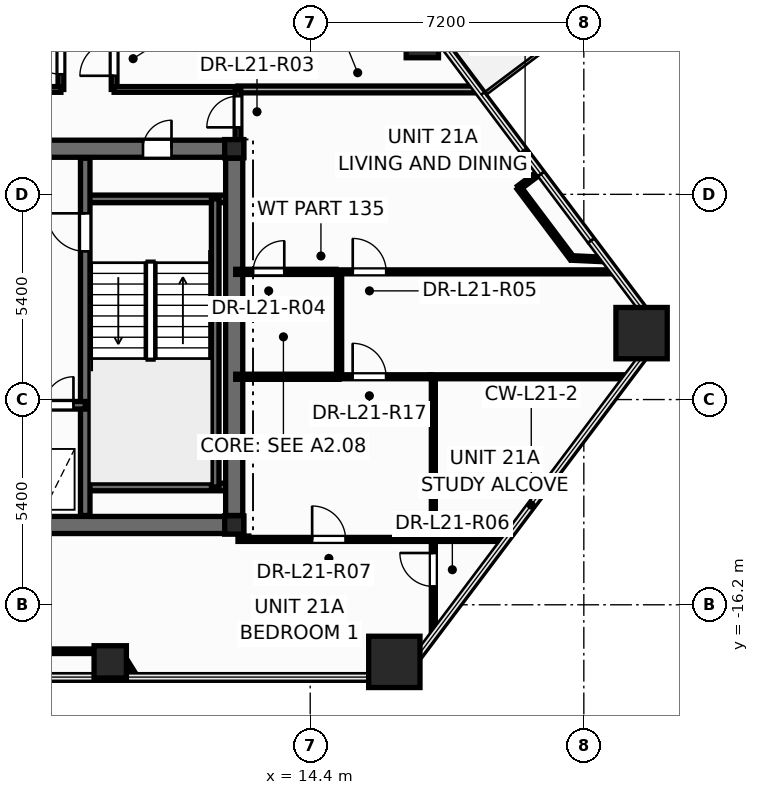
"""IFC4 building model, lengths in metres.
Left out: names, types, materials, properties, quantities, classifications, styles, units other than length and angle.
Written with IfcOpenShell. Run it as: python <this file> out.ifc"""

import sys

from ifc_helpers import new_model, si_unit, direction, frame, frame_2d, origin, origin_2d, place, context, subcontext, project, spatial, rectangle, hollow_rectangle, hollow_circle, i_section, extrude, element, fill, save


model = new_model("IFC4")
c1 = context("Model", 3, precision=1e-05, world=origin(), true_north=direction((0.0, 1.0)))
c2 = subcontext(c1, "Body", "Model", "MODEL_VIEW")
j1 = project(units=[si_unit("LENGTHUNIT", "METRE"), si_unit("PLANEANGLEUNIT", "RADIAN")], contexts=[c1])
p1 = place(None, origin())
s1 = spatial("IfcSite", under=j1, at=p1, CompositionType="ELEMENT")
p2 = place(p1, origin())
s2 = spatial("IfcBuilding", under=s1, at=p2, CompositionType="ELEMENT")
p3 = place(p2, frame((0.0, 0.0, 82.8)))
s3 = spatial("IfcBuildingStorey", under=s2, at=p3, CompositionType="ELEMENT", Elevation=82.8)
for number, where, z_axis, x_axis in (
    (1, (16.614, -17.702, 0.0), (0.0, 0.0, 1.0), (1.0, 0.0, 0.0)),
    (2, (23.119, -9.052, 0.0), (0.0, 0.0, 1.0), (1.0, 0.0, 0.0)),
):
    element("IfcColumn", number, at=place(p3, frame(where, z_axis=z_axis, x_axis=x_axis)), inside=s3, PredefinedType="COLUMN", context=c2, shape_type="SweptSolid", body=[
        extrude(hollow_rectangle(XDim=1.35, YDim=1.35, WallThickness=0.065, at=origin_2d()), origin(), (0.0, 0.0, 1.0), 3.6),
    ])
for number, where, z_axis, x_axis in (
    (3, (9.138, -17.702, 0.0), (0.0, 0.0, 1.0), (1.0, 0.0, 0.0)),
    (4, (17.351, -1.381, 0.0), (0.0, 0.0, 1.0), (1.0, 0.0, 0.0)),
):
    element("IfcColumn", number, at=place(p3, frame(where, z_axis=z_axis, x_axis=x_axis)), inside=s3, PredefinedType="COLUMN", context=c2, shape_type="SweptSolid", body=[
        extrude(hollow_circle(Radius=0.425, WallThickness=0.038, at=origin_2d()), origin(), (0.0, 0.0, 1.0), 3.6),
    ])
for number, where, z_axis, x_axis in (
    (5, (12.4, -14.1, 0.0), (0.0, 0.0, 1.0), (1.0, 0.0, 0.0)),
    (6, (12.4, -4.2, 0.0), (0.0, 0.0, 1.0), (1.0, 0.0, 0.0)),
):
    element("IfcColumn", number, at=place(p3, frame(where, z_axis=z_axis, x_axis=x_axis)), inside=s3, PredefinedType="COLUMN", context=c2, shape_type="SweptSolid", body=[
        extrude(i_section(OverallWidth=0.5, OverallDepth=0.482, WebThickness=0.04, FlangeThickness=0.045, at=origin_2d()), origin(), (0.0, 0.0, 1.0), 3.6),
    ])
p4 = place(p3, frame((-12.65, -14.1, 0.0), z_axis=(0.0, 0.0, 1.0), x_axis=(1.0, 0.0, 0.0)))
e7 = element("IfcWall", 7, at=p4, inside=s3, PredefinedType="SHEAR", context=c2, shape_type="SweptSolid", body=[
    extrude(rectangle(XDim=25.3, YDim=0.45, at=frame_2d((12.65, 0.0))), origin(), (0.0, 0.0, 1.0), 3.6),
])
p5 = place(p3, frame((-12.65, -4.2, 0.0), z_axis=(0.0, 0.0, 1.0), x_axis=(1.0, 0.0, 0.0)))
e8 = element("IfcWall", 8, at=p5, inside=s3, PredefinedType="SHEAR", context=c2, shape_type="SweptSolid", body=[
    extrude(rectangle(XDim=25.3, YDim=0.45, at=frame_2d((12.65, 0.0))), origin(), (0.0, 0.0, 1.0), 3.6),
])
p6 = place(p5, frame((1.85, 0.0, 0.0)))
e9 = element("IfcOpeningElement", 9, at=p6, cuts=e8, PredefinedType="OPENING", context=c2, shape_type="SweptSolid", body=[
    extrude(rectangle(XDim=0.756, YDim=2.054, at=frame_2d((0.375, 1.027))), frame((0.0, 0.235, 0.0), z_axis=(0.0, -1.0, 0.0), x_axis=(1.0, 0.0, 0.0)), (0.0, 0.0, 1.0), 0.47),
])
p7 = place(p5, frame((22.65, 0.0, 0.0)))
e10 = element("IfcOpeningElement", 10, at=p7, cuts=e8, PredefinedType="OPENING", context=c2, shape_type="SweptSolid", body=[
    extrude(rectangle(XDim=0.756, YDim=2.054, at=frame_2d((0.375, 1.027))), frame((0.0, 0.235, 0.0), z_axis=(0.0, -1.0, 0.0), x_axis=(1.0, 0.0, 0.0)), (0.0, 0.0, 1.0), 0.47),
])
p8 = place(p5, frame((5.85, 0.0, 0.0)))
e11 = element("IfcOpeningElement", 11, at=p8, cuts=e8, PredefinedType="OPENING", context=c2, shape_type="SweptSolid", body=[
    extrude(rectangle(XDim=1.006, YDim=2.104, at=frame_2d((0.5, 1.052))), frame((0.0, 0.235, 0.0), z_axis=(0.0, -1.0, 0.0), x_axis=(1.0, 0.0, 0.0)), (0.0, 0.0, 1.0), 0.47),
])
p9 = place(p5, frame((10.35, 0.0, 0.0)))
e12 = element("IfcOpeningElement", 12, at=p9, cuts=e8, PredefinedType="OPENING", context=c2, shape_type="SweptSolid", body=[
    extrude(rectangle(XDim=1.406, YDim=2.154, at=frame_2d((0.7, 1.077))), frame((0.0, 0.235, 0.0), z_axis=(0.0, -1.0, 0.0), x_axis=(1.0, 0.0, 0.0)), (0.0, 0.0, 1.0), 0.47),
])
p10 = place(p5, frame((18.45, 0.0, 0.0)))
e13 = element("IfcOpeningElement", 13, at=p10, cuts=e8, PredefinedType="OPENING", context=c2, shape_type="SweptSolid", body=[
    extrude(rectangle(XDim=1.006, YDim=2.104, at=frame_2d((0.5, 1.052))), frame((0.0, 0.235, 0.0), z_axis=(0.0, -1.0, 0.0), x_axis=(1.0, 0.0, 0.0)), (0.0, 0.0, 1.0), 0.47),
])
for number, where, z_axis, x_axis in (
    (14, (8.48, -5.52, 0.0), (0.0, 0.0, 1.0), (1.0, 0.0, 0.0)),
    (15, (8.48, -13.1, 0.0), (0.0, 0.0, 1.0), (1.0, 0.0, 0.0)),
):
    element("IfcWall", number, at=place(p3, frame(where, z_axis=z_axis, x_axis=x_axis)), inside=s3, PredefinedType="SOLIDWALL", context=c2, shape_type="SweptSolid", body=[
        extrude(rectangle(XDim=3.87, YDim=0.2, at=frame_2d((1.935, 0.0))), origin(), (0.0, 0.0, 1.0), 3.6),
    ])
p11 = place(p3, frame((11.9, -13.1, 0.0), z_axis=(0.0, 0.0, 1.0), x_axis=(0.0, 1.0, 0.0)))
e16 = element("IfcWall", 16, at=p11, inside=s3, PredefinedType="SOLIDWALL", context=c2, shape_type="SweptSolid", body=[
    extrude(rectangle(XDim=7.58, YDim=0.2, at=frame_2d((3.79, 0.0))), origin(), (0.0, 0.0, 1.0), 3.6),
])
p12 = place(p3, frame((8.48, -13.85, 0.0), z_axis=(0.0, 0.0, 1.0), x_axis=(0.0, 1.0, 0.0)))
e17 = element("IfcWall", 17, at=p12, inside=s3, PredefinedType="SHEAR", context=c2, shape_type="SweptSolid", body=[
    extrude(rectangle(XDim=9.4, YDim=0.25, at=frame_2d((4.7, 0.0))), origin(), (0.0, 0.0, 1.0), 3.6),
])
p13 = place(p12, frame((6.95, 0.0, 0.0)))
e18 = element("IfcOpeningElement", 18, at=p13, cuts=e17, PredefinedType="OPENING", context=c2, shape_type="SweptSolid", body=[
    extrude(rectangle(XDim=1.006, YDim=2.104, at=frame_2d((0.5, 1.052))), frame((0.0, 0.135, 0.0), z_axis=(0.0, -1.0, 0.0), x_axis=(1.0, 0.0, 0.0)), (0.0, 0.0, 1.0), 0.27),
])
p14 = place(p3, frame((5.12, -10.95, 0.0), z_axis=(0.0, 0.0, 1.0), x_axis=(1.0, 0.0, 0.0)))
e19 = element("IfcWall", 19, at=p14, inside=s3, PredefinedType="SOLIDWALL", context=c2, shape_type="SweptSolid", body=[
    extrude(rectangle(XDim=3.36, YDim=0.2, at=frame_2d((1.68, 0.0))), origin(), (0.0, 0.0, 1.0), 3.6),
])
p15 = place(p14, frame((0.42, 0.0, 0.0)))
e20 = element("IfcOpeningElement", 20, at=p15, cuts=e19, PredefinedType="OPENING", context=c2, shape_type="SweptSolid", body=[
    extrude(rectangle(XDim=1.106, YDim=2.104, at=frame_2d((0.55, 1.052))), frame((0.0, 0.11, 0.0), z_axis=(0.0, -1.0, 0.0), x_axis=(1.0, 0.0, 0.0)), (0.0, 0.0, 1.0), 0.22),
])
p16 = place(p14, frame((2.3, 0.0, 0.0)))
e21 = element("IfcOpeningElement", 21, at=p16, cuts=e19, PredefinedType="OPENING", context=c2, shape_type="SweptSolid", body=[
    extrude(rectangle(XDim=0.756, YDim=2.054, at=frame_2d((0.375, 1.027))), frame((0.0, 0.11, 0.0), z_axis=(0.0, -1.0, 0.0), x_axis=(1.0, 0.0, 0.0)), (0.0, 0.0, 1.0), 0.22),
])
p17 = place(p3, frame((12.4, -13.85, 0.0), z_axis=(0.0, 0.0, 1.0), x_axis=(0.0, 1.0, 0.0)))
e22 = element("IfcWall", 22, at=p17, inside=s3, PredefinedType="SHEAR", context=c2, shape_type="SweptSolid", body=[
    extrude(rectangle(XDim=9.4, YDim=0.45, at=frame_2d((4.7, 0.0))), origin(), (0.0, 0.0, 1.0), 3.6),
])
p18 = place(p3, frame((7.84, -2.64, 0.0), z_axis=(0.0, 0.0, 1.0), x_axis=(0.0, 1.0, 0.0)))
e23 = element("IfcWall", 23, at=p18, inside=s3, PredefinedType="PARTITIONING", context=c2, shape_type="SweptSolid", body=[
    extrude(rectangle(XDim=8.84, YDim=0.15, at=frame_2d((4.42, 0.0))), origin(), (0.0, 0.0, 1.0), 2.509),
])
p19 = place(p18, frame((0.399, 0.0, 0.0)))
e24 = element("IfcOpeningElement", 24, at=p19, cuts=e23, PredefinedType="OPENING", context=c2, shape_type="SweptSolid", body=[
    extrude(rectangle(XDim=0.906, YDim=2.104, at=frame_2d((0.45, 1.052))), frame((0.0, 0.085, 0.0), z_axis=(0.0, -1.0, 0.0), x_axis=(1.0, 0.0, 0.0)), (0.0, 0.0, 1.0), 0.17),
])
p20 = place(p3, frame((9.24, -2.64, 0.0), z_axis=(0.0, 0.0, 1.0), x_axis=(0.0, 1.0, 0.0)))
e25 = element("IfcWall", 25, at=p20, inside=s3, PredefinedType="PARTITIONING", context=c2, shape_type="SweptSolid", body=[
    extrude(rectangle(XDim=8.84, YDim=0.15, at=frame_2d((4.42, 0.0))), origin(), (0.0, 0.0, 1.0), 2.509),
])
p21 = place(p20, frame((0.359, 0.0, 0.0)))
e26 = element("IfcOpeningElement", 26, at=p21, cuts=e25, PredefinedType="OPENING", context=c2, shape_type="SweptSolid", body=[
    extrude(rectangle(XDim=0.906, YDim=2.104, at=frame_2d((0.45, 1.052))), frame((0.0, 0.085, 0.0), z_axis=(0.0, -1.0, 0.0), x_axis=(1.0, 0.0, 0.0)), (0.0, 0.0, 1.0), 0.17),
])
p22 = place(p3, frame((15.08, -7.44, 0.0), z_axis=(0.0, 0.0, 1.0), x_axis=(1.0, 0.0, 0.0)))
e27 = element("IfcWall", 27, at=p22, inside=s3, PredefinedType="PARTITIONING", context=c2, shape_type="SweptSolid", body=[
    extrude(rectangle(XDim=7.328, YDim=0.105, at=frame_2d((3.664, 0.0))), origin(), (0.0, 0.0, 1.0), 2.325),
])
p23 = place(p22, frame((0.439, 0.0, 0.0)))
e28 = element("IfcOpeningElement", 28, at=p23, cuts=e27, PredefinedType="OPENING", context=c2, shape_type="SweptSolid", body=[
    extrude(rectangle(XDim=0.886, YDim=2.104, at=frame_2d((0.44, 1.052))), frame((0.0, 0.062, 0.0), z_axis=(0.0, -1.0, 0.0), x_axis=(1.0, 0.0, 0.0)), (0.0, 0.0, 1.0), 0.125),
])
p24 = place(p3, frame((12.5, -14.48, 0.0), z_axis=(0.0, 0.0, 1.0), x_axis=(1.0, 0.0, 0.0)))
e29 = element("IfcWall", 29, at=p24, inside=s3, PredefinedType="PARTITIONING", context=c2, shape_type="SweptSolid", body=[
    extrude(rectangle(XDim=7.038, YDim=0.105, at=frame_2d((3.519, 0.0))), origin(), (0.0, 0.0, 1.0), 2.713),
])
p25 = place(p24, frame((1.951, 0.0, 0.0)))
e30 = element("IfcOpeningElement", 30, at=p25, cuts=e29, PredefinedType="OPENING", context=c2, shape_type="SweptSolid", body=[
    extrude(rectangle(XDim=0.886, YDim=2.104, at=frame_2d((0.44, 1.052))), frame((0.0, 0.062, 0.0), z_axis=(0.0, -1.0, 0.0), x_axis=(1.0, 0.0, 0.0)), (0.0, 0.0, 1.0), 0.125),
])
p26 = place(p3, frame((1.662, -2.64, 0.0), z_axis=(0.0, 0.0, 1.0), x_axis=(1.0, 0.0, 0.0)))
e31 = element("IfcWall", 31, at=p26, inside=s3, PredefinedType="PARTITIONING", context=c2, shape_type="SweptSolid", body=[
    extrude(rectangle(XDim=6.178, YDim=0.15, at=frame_2d((3.089, 0.0))), origin(), (0.0, 0.0, 1.0), 2.325),
])
p27 = place(p3, frame((12.5, -2.64, 0.0), z_axis=(0.0, 0.0, 1.0), x_axis=(1.0, 0.0, 0.0)))
e32 = element("IfcWall", 32, at=p27, inside=s3, PredefinedType="PARTITIONING", context=c2, shape_type="SweptSolid", body=[
    extrude(rectangle(XDim=6.298, YDim=0.18, at=frame_2d((3.149, 0.0))), origin(), (0.0, 0.0, 1.0), 2.713),
])
p28 = place(p3, frame((17.58, -10.2, 0.0), z_axis=(0.0, 0.0, 1.0), x_axis=(1.0, 0.0, 0.0)))
e33 = element("IfcWall", 33, at=p28, inside=s3, PredefinedType="PARTITIONING", context=c2, shape_type="SweptSolid", body=[
    extrude(rectangle(XDim=5.176, YDim=0.105, at=frame_2d((2.588, 0.0))), origin(), (0.0, 0.0, 1.0), 2.713),
])
p29 = place(p3, frame((17.64, -14.48, 0.0), z_axis=(0.0, 0.0, 1.0), x_axis=(0.0, 1.0, 0.0)))
e34 = element("IfcWall", 34, at=p29, inside=s3, PredefinedType="PARTITIONING", context=c2, shape_type="SweptSolid", body=[
    extrude(rectangle(XDim=4.28, YDim=0.105, at=frame_2d((2.14, 0.0))), origin(), (0.0, 0.0, 1.0), 3.35),
])
p30 = place(p3, frame((5.741, -17.422, 0.0), z_axis=(0.0, 0.0, 1.0), x_axis=(1.0, 0.0, 0.0)))
e35 = element("IfcWall", 35, at=p30, inside=s3, PredefinedType="PARTITIONING", context=c2, shape_type="SweptSolid", body=[
    extrude(rectangle(XDim=3.631, YDim=0.12, at=frame_2d((1.815, 0.0))), origin(), (0.0, 0.0, 1.0), 2.713),
])
p31 = place(p3, frame((9.24, -2.64, 0.0), z_axis=(0.0, 0.0, 1.0), x_axis=(1.0, 0.0, 0.0)))
e36 = element("IfcWall", 36, at=p31, inside=s3, PredefinedType="PARTITIONING", context=c2, shape_type="SweptSolid", body=[
    extrude(rectangle(XDim=3.26, YDim=0.15, at=frame_2d((1.63, 0.0))), origin(), (0.0, 0.0, 1.0), 3.35),
])
p32 = place(p3, frame((12.44, -7.44, 0.0), z_axis=(0.0, 0.0, 1.0), x_axis=(1.0, 0.0, 0.0)))
e37 = element("IfcWall", 37, at=p32, inside=s3, PredefinedType="PARTITIONING", context=c2, shape_type="SweptSolid", body=[
    extrude(rectangle(XDim=2.638, YDim=0.135, at=frame_2d((1.319, 0.0))), origin(), (0.0, 0.0, 1.0), 2.713),
])
p33 = place(p32, frame((0.458, 0.0, 0.0)))
e38 = element("IfcOpeningElement", 38, at=p33, cuts=e37, PredefinedType="OPENING", context=c2, shape_type="SweptSolid", body=[
    extrude(rectangle(XDim=0.826, YDim=2.104, at=frame_2d((0.41, 1.052))), frame((0.0, 0.078, 0.0), z_axis=(0.0, -1.0, 0.0), x_axis=(1.0, 0.0, 0.0)), (0.0, 0.0, 1.0), 0.155),
])
p34 = place(p3, frame((15.16, -10.2, 0.0), z_axis=(0.0, 0.0, 1.0), x_axis=(0.0, 1.0, 0.0)))
e39 = element("IfcWall", 39, at=p34, inside=s3, PredefinedType="PARTITIONING", context=c2, shape_type="SweptSolid", body=[
    extrude(rectangle(XDim=2.76, YDim=0.135, at=frame_2d((1.38, 0.0))), origin(), (0.0, 0.0, 1.0), 3.35),
])
p35 = place(p3, frame((12.44, -10.2, 0.0), z_axis=(0.0, 0.0, 1.0), x_axis=(1.0, 0.0, 0.0)))
e40 = element("IfcWall", 40, at=p35, inside=s3, PredefinedType="PARTITIONING", context=c2, shape_type="SweptSolid", body=[
    extrude(rectangle(XDim=2.72, YDim=0.135, at=frame_2d((1.36, 0.0))), origin(), (0.0, 0.0, 1.0), 2.713),
])
p36 = place(p3, frame((15.16, -10.2, 0.0), z_axis=(0.0, 0.0, 1.0), x_axis=(1.0, 0.0, 0.0)))
e41 = element("IfcWall", 41, at=p36, inside=s3, PredefinedType="PARTITIONING", context=c2, shape_type="SweptSolid", body=[
    extrude(rectangle(XDim=2.418, YDim=0.105, at=frame_2d((1.209, 0.0))), origin(), (0.0, 0.0, 1.0), 3.35),
])
p37 = place(p36, frame((0.357, 0.0, 0.0)))
e42 = element("IfcOpeningElement", 42, at=p37, cuts=e41, PredefinedType="OPENING", context=c2, shape_type="SweptSolid", body=[
    extrude(rectangle(XDim=0.886, YDim=2.104, at=frame_2d((0.44, 1.052))), frame((0.0, 0.062, 0.0), z_axis=(0.0, -1.0, 0.0), x_axis=(1.0, 0.0, 0.0)), (0.0, 0.0, 1.0), 0.125),
])
p38 = place(p3, frame((17.64, -17.003, 0.0), z_axis=(0.0, 0.0, 1.0), x_axis=(0.0, 1.0, 0.0)))
e43 = element("IfcWall", 43, at=p38, inside=s3, PredefinedType="PARTITIONING", context=c2, shape_type="SweptSolid", body=[
    extrude(rectangle(XDim=2.523, YDim=0.105, at=frame_2d((1.262, 0.0))), origin(), (0.0, 0.0, 1.0), 2.713),
])
p39 = place(p38, frame((1.286, 0.0, 0.0)))
e44 = element("IfcOpeningElement", 44, at=p39, cuts=e43, PredefinedType="OPENING", context=c2, shape_type="SweptSolid", body=[
    extrude(rectangle(XDim=0.886, YDim=2.104, at=frame_2d((0.44, 1.052))), frame((0.0, 0.062, 0.0), z_axis=(0.0, -1.0, 0.0), x_axis=(1.0, 0.0, 0.0)), (0.0, 0.0, 1.0), 0.125),
])
p40 = place(p3, frame((21.282, -7.074, 0.0), z_axis=(0.0, 0.0, 1.0), x_axis=(-0.600996618, 0.799251565624, 0.0)))
e45 = element("IfcWall", 45, at=p40, inside=s3, PredefinedType="PARTITIONING", context=c2, shape_type="SweptSolid", body=[
    extrude(rectangle(XDim=2.312, YDim=0.12, at=frame_2d((1.156, 0.0))), origin(), (0.0, 0.0, 1.0), 3.35),
])
p41 = place(p3, frame((12.5, -4.24, 0.0), z_axis=(0.0, 0.0, 1.0), x_axis=(0.0, 1.0, 0.0)))
e46 = element("IfcWall", 46, at=p41, inside=s3, PredefinedType="PARTITIONING", context=c2, shape_type="SweptSolid", body=[
    extrude(rectangle(XDim=1.6, YDim=0.15, at=frame_2d((0.8, 0.0))), origin(), (0.0, 0.0, 1.0), 2.325),
])
p42 = place(p41, frame((0.602, 0.0, 0.0)))
e47 = element("IfcOpeningElement", 47, at=p42, cuts=e46, PredefinedType="OPENING", context=c2, shape_type="SweptSolid", body=[
    extrude(rectangle(XDim=0.826, YDim=2.104, at=frame_2d((0.41, 1.052))), frame((0.0, 0.085, 0.0), z_axis=(0.0, -1.0, 0.0), x_axis=(1.0, 0.0, 0.0)), (0.0, 0.0, 1.0), 0.17),
])
p43 = place(p3, frame((22.151, -7.115, 0.0), z_axis=(0.0, 0.0, 1.0), x_axis=(-0.998902149118, 0.046845453216, 0.0)))
e48 = element("IfcWall", 48, at=p43, inside=s3, PredefinedType="PARTITIONING", context=c2, shape_type="SweptSolid", body=[
    extrude(rectangle(XDim=0.87, YDim=0.12, at=frame_2d((0.435, 0.0))), origin(), (0.0, 0.0, 1.0), 2.713),
])
p44 = place(p3, frame((9.373, -17.422, 0.0), z_axis=(0.0, 0.0, 1.0), x_axis=(0.528524813, -0.848917853531, 0.0)))
e49 = element("IfcWall", 49, at=p44, inside=s3, PredefinedType="PARTITIONING", context=c2, shape_type="SweptSolid", body=[
    extrude(rectangle(XDim=0.79, YDim=0.12, at=frame_2d((0.395, 0.0))), origin(), (0.0, 0.0, 1.0), 2.713),
])
p45 = place(p3, frame((19.893, -5.227, 0.0), z_axis=(0.0, 0.0, 1.0), x_axis=(0.799387472953, 0.600815835415, 0.0)))
e50 = element("IfcWall", 50, at=p45, inside=s3, PredefinedType="PARTITIONING", context=c2, shape_type="SweptSolid", body=[
    extrude(rectangle(XDim=0.67, YDim=0.12, at=frame_2d((0.335, 0.0))), origin(), (0.0, 0.0, 1.0), 2.713),
])
p46 = place(p13, origin())
e51 = element("IfcDoor", 51, at=p46, inside=s3, OperationType="SINGLE_SWING_RIGHT", PredefinedType="DOOR", context=c2, shape_type="SweptSolid", body=[
    extrude(rectangle(XDim=1.0, YDim=2.1, at=frame_2d((0.5, 1.05))), frame((0.0, 0.025, 0.0), z_axis=(0.0, -1.0, 0.0), x_axis=(1.0, 0.0, 0.0)), (0.0, 0.0, 1.0), 0.05),
])
fill(e18, e51)
p47 = place(p16, origin())
e52 = element("IfcDoor", 52, at=p47, inside=s3, OperationType="SINGLE_SWING_RIGHT", PredefinedType="DOOR", context=c2, shape_type="SweptSolid", body=[
    extrude(rectangle(XDim=0.75, YDim=2.05, at=frame_2d((0.375, 1.025))), frame((0.0, 0.025, 0.0), z_axis=(0.0, -1.0, 0.0), x_axis=(1.0, 0.0, 0.0)), (0.0, 0.0, 1.0), 0.05),
])
fill(e21, e52)
p48 = place(p7, origin())
e53 = element("IfcDoor", 53, at=p48, inside=s3, OperationType="SINGLE_SWING_RIGHT", PredefinedType="DOOR", context=c2, shape_type="SweptSolid", body=[
    extrude(rectangle(XDim=0.75, YDim=2.05, at=frame_2d((0.375, 1.025))), frame((0.0, 0.025, 0.0), z_axis=(0.0, -1.0, 0.0), x_axis=(1.0, 0.0, 0.0)), (0.0, 0.0, 1.0), 0.05),
])
fill(e10, e53)
p49 = place(p42, origin())
e54 = element("IfcDoor", 54, at=p49, inside=s3, OperationType="SINGLE_SWING_LEFT", PredefinedType="DOOR", context=c2, shape_type="SweptSolid", body=[
    extrude(rectangle(XDim=0.82, YDim=2.1, at=frame_2d((0.41, 1.05))), frame((0.0, 0.025, 0.0), z_axis=(0.0, -1.0, 0.0), x_axis=(1.0, 0.0, 0.0)), (0.0, 0.0, 1.0), 0.05),
])
fill(e47, e54)
p50 = place(p33, origin())
e55 = element("IfcDoor", 55, at=p50, inside=s3, OperationType="SINGLE_SWING_RIGHT", PredefinedType="DOOR", context=c2, shape_type="SweptSolid", body=[
    extrude(rectangle(XDim=0.82, YDim=2.1, at=frame_2d((0.41, 1.05))), frame((0.0, 0.025, 0.0), z_axis=(0.0, -1.0, 0.0), x_axis=(1.0, 0.0, 0.0)), (0.0, 0.0, 1.0), 0.05),
])
fill(e38, e55)
p51 = place(p23, origin())
e56 = element("IfcDoor", 56, at=p51, inside=s3, OperationType="SINGLE_SWING_LEFT", PredefinedType="DOOR", context=c2, shape_type="SweptSolid", body=[
    extrude(rectangle(XDim=0.88, YDim=2.1, at=frame_2d((0.44, 1.05))), frame((0.0, 0.025, 0.0), z_axis=(0.0, -1.0, 0.0), x_axis=(1.0, 0.0, 0.0)), (0.0, 0.0, 1.0), 0.05),
])
fill(e28, e56)
p52 = place(p39, origin())
e57 = element("IfcDoor", 57, at=p52, inside=s3, OperationType="SINGLE_SWING_RIGHT", PredefinedType="DOOR", context=c2, shape_type="SweptSolid", body=[
    extrude(rectangle(XDim=0.88, YDim=2.1, at=frame_2d((0.44, 1.05))), frame((0.0, 0.025, 0.0), z_axis=(0.0, -1.0, 0.0), x_axis=(1.0, 0.0, 0.0)), (0.0, 0.0, 1.0), 0.05),
])
fill(e44, e57)
p53 = place(p25, origin())
e58 = element("IfcDoor", 58, at=p53, inside=s3, OperationType="SINGLE_SWING_LEFT", PredefinedType="DOOR", context=c2, shape_type="SweptSolid", body=[
    extrude(rectangle(XDim=0.88, YDim=2.1, at=frame_2d((0.44, 1.05))), frame((0.0, 0.025, 0.0), z_axis=(0.0, -1.0, 0.0), x_axis=(1.0, 0.0, 0.0)), (0.0, 0.0, 1.0), 0.05),
])
fill(e30, e58)
p54 = place(p19, origin())
e59 = element("IfcDoor", 59, at=p54, inside=s3, OperationType="SINGLE_SWING_RIGHT", PredefinedType="DOOR", context=c2, shape_type="SweptSolid", body=[
    extrude(rectangle(XDim=0.9, YDim=2.1, at=frame_2d((0.45, 1.05))), frame((0.0, 0.025, 0.0), z_axis=(0.0, -1.0, 0.0), x_axis=(1.0, 0.0, 0.0)), (0.0, 0.0, 1.0), 0.05),
])
fill(e24, e59)
p55 = place(p21, origin())
e60 = element("IfcDoor", 60, at=p55, inside=s3, OperationType="SINGLE_SWING_LEFT", PredefinedType="DOOR", context=c2, shape_type="SweptSolid", body=[
    extrude(rectangle(XDim=0.9, YDim=2.1, at=frame_2d((0.45, 1.05))), frame((0.0, 0.025, 0.0), z_axis=(0.0, -1.0, 0.0), x_axis=(1.0, 0.0, 0.0)), (0.0, 0.0, 1.0), 0.05),
])
fill(e26, e60)
p56 = place(p37, origin())
e61 = element("IfcDoor", 61, at=p56, inside=s3, OperationType="SINGLE_SWING_LEFT", PredefinedType="DOOR", context=c2, shape_type="SweptSolid", body=[
    extrude(rectangle(XDim=0.88, YDim=2.1, at=frame_2d((0.44, 1.05))), frame((0.0, 0.025, 0.0), z_axis=(0.0, -1.0, 0.0), x_axis=(1.0, 0.0, 0.0)), (0.0, 0.0, 1.0), 0.05),
])
fill(e42, e61)
save(model, sys.argv[1])
